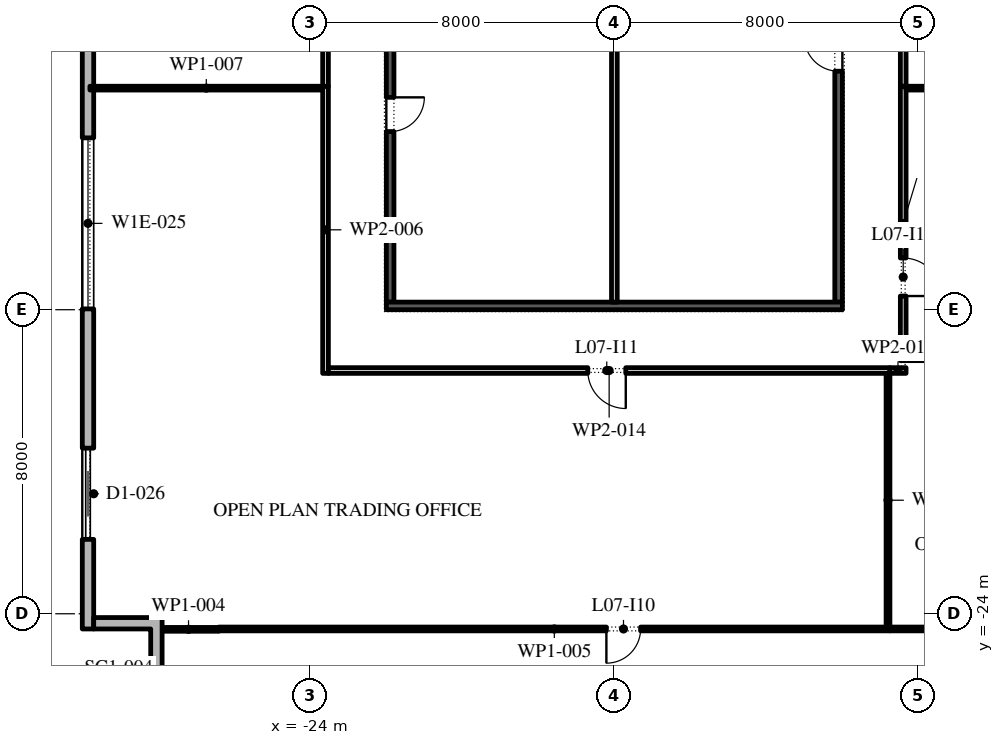
"""IFC4 building model, lengths in metres.
Left out: names, types, materials, properties, quantities, classifications, styles, units other than length and angle.
Written with IfcOpenShell. Run it as: python <this file> out.ifc"""

import sys

from ifc_helpers import new_model, si_unit, direction, frame, frame_2d, origin, place, context, subcontext, project, spatial, polyline, rectangle, outline, extrude, element, fill, save


model = new_model("IFC4")
c1 = context("Model", 3, precision=1e-05, world=origin(), true_north=direction((0.0, 1.0)))
c2 = subcontext(c1, "Body", "Model", "MODEL_VIEW")
j1 = project(units=[si_unit("LENGTHUNIT", "METRE"), si_unit("PLANEANGLEUNIT", "RADIAN")], contexts=[c1])
p1 = place(None, origin())
s1 = spatial("IfcSite", under=j1, at=p1, CompositionType="ELEMENT")
p2 = place(p1, origin())
s2 = spatial("IfcBuilding", under=s1, at=p2, CompositionType="ELEMENT")
p3 = place(p2, frame((0.0, 0.0, 39.6)))
s3 = spatial("IfcBuildingStorey", under=s2, at=p3, CompositionType="ELEMENT", Elevation=39.6)
p4 = place(p3, frame((-29.85, 25.1, 0.0), z_axis=(0.0, 0.0, 1.0), x_axis=(0.0, -1.0, 0.0)))
e1 = element("IfcWall", 1, at=p4, inside=s3, PredefinedType="STANDARD", context=c2, shape_type="SweptSolid", body=[
    extrude(rectangle(XDim=49.5, YDim=0.3, at=frame_2d((24.75, 0.0))), origin(), (0.0, 0.0, 1.0), 4.0),
])
p5 = place(p4, frame((1.157, 0.0, 0.45)))
e2 = element("IfcOpeningElement", 2, at=p5, cuts=e1, PredefinedType="OPENING", context=c2, shape_type="SweptSolid", body=[
    extrude(rectangle(XDim=4.5, YDim=2.875, at=frame_2d((2.25, 1.438))), frame((0.0, 0.16, 0.0), z_axis=(0.0, -1.0, 0.0), x_axis=(1.0, 0.0, 0.0)), (0.0, 0.0, 1.0), 0.32),
])
p6 = place(p4, frame((8.121, 0.0, 0.45)))
e3 = element("IfcOpeningElement", 3, at=p6, cuts=e1, PredefinedType="OPENING", context=c2, shape_type="SweptSolid", body=[
    extrude(rectangle(XDim=4.5, YDim=3.05, at=frame_2d((2.25, 1.525))), frame((0.0, 0.16, 0.0), z_axis=(0.0, -1.0, 0.0), x_axis=(1.0, 0.0, 0.0)), (0.0, 0.0, 1.0), 0.32),
])
p7 = place(p4, frame((16.286, 0.0, 0.0)))
e4 = element("IfcOpeningElement", 4, at=p7, cuts=e1, PredefinedType="OPENING", context=c2, shape_type="SweptSolid", body=[
    extrude(rectangle(XDim=2.4, YDim=3.325, at=frame_2d((1.2, 1.663))), frame((0.0, 0.16, 0.0), z_axis=(0.0, -1.0, 0.0), x_axis=(1.0, 0.0, 0.0)), (0.0, 0.0, 1.0), 0.32),
])
p8 = place(p4, frame((22.35, 0.0, 0.45)))
e5 = element("IfcOpeningElement", 5, at=p8, cuts=e1, PredefinedType="OPENING", context=c2, shape_type="SweptSolid", body=[
    extrude(rectangle(XDim=4.5, YDim=2.875, at=frame_2d((2.25, 1.438))), frame((0.0, 0.16, 0.0), z_axis=(0.0, -1.0, 0.0), x_axis=(1.0, 0.0, 0.0)), (0.0, 0.0, 1.0), 0.32),
])
p9 = place(p4, frame((29.464, 0.0, 0.45)))
e6 = element("IfcOpeningElement", 6, at=p9, cuts=e1, PredefinedType="OPENING", context=c2, shape_type="SweptSolid", body=[
    extrude(rectangle(XDim=4.5, YDim=2.875, at=frame_2d((2.25, 1.438))), frame((0.0, 0.16, 0.0), z_axis=(0.0, -1.0, 0.0), x_axis=(1.0, 0.0, 0.0)), (0.0, 0.0, 1.0), 0.32),
])
p10 = place(p4, frame((36.579, 0.0, 0.45)))
e7 = element("IfcOpeningElement", 7, at=p10, cuts=e1, PredefinedType="OPENING", context=c2, shape_type="SweptSolid", body=[
    extrude(rectangle(XDim=4.5, YDim=2.825, at=frame_2d((2.25, 1.413))), frame((0.0, 0.16, 0.0), z_axis=(0.0, -1.0, 0.0), x_axis=(1.0, 0.0, 0.0)), (0.0, 0.0, 1.0), 0.32),
])
p11 = place(p4, frame((44.743, 0.0, 0.0)))
e8 = element("IfcOpeningElement", 8, at=p11, cuts=e1, PredefinedType="OPENING", context=c2, shape_type="SweptSolid", body=[
    extrude(rectangle(XDim=2.4, YDim=3.5, at=frame_2d((1.2, 1.75))), frame((0.0, 0.16, 0.0), z_axis=(0.0, -1.0, 0.0), x_axis=(1.0, 0.0, 0.0)), (0.0, 0.0, 1.0), 0.32),
])
p12 = place(p3, origin())
e9 = element("IfcWall", 9, at=p12, inside=s3, PredefinedType="STANDARD", context=c2, shape_type="SweptSolid", body=[
    extrude(outline(polyline([(-26.4, -26.2), (-28.2, -26.2), (-28.2, -24.4), (-29.7, -24.4), (-29.7, -24.1), (-27.9, -24.1), (-27.9, -25.9), (-26.1, -25.9), (-26.1, -28.0), (-26.4, -28.0), (-26.4, -26.2)])), origin(), (0.0, 0.0, 1.0), 4.0),
])
p13 = place(p3, frame((-21.9, -15.8, 0.0), z_axis=(0.0, 0.0, 1.0), x_axis=(0.0, 1.0, 0.0)))
e10 = element("IfcWall", 10, at=p13, inside=s3, PredefinedType="SHEAR", context=c2, shape_type="SweptSolid", body=[
    extrude(rectangle(XDim=13.05, YDim=0.2, at=frame_2d((6.525, 0.0))), origin(), (0.0, 0.0, 1.0), 4.0),
])
p14 = place(p13, frame((4.488, 0.0, 0.0)))
e11 = element("IfcOpeningElement", 11, at=p14, cuts=e10, PredefinedType="OPENING", context=c2, shape_type="SweptSolid", body=[
    extrude(rectangle(XDim=0.9, YDim=2.1, at=frame_2d((0.45, 1.05))), frame((0.0, 0.11, 0.0), z_axis=(0.0, -1.0, 0.0), x_axis=(1.0, 0.0, 0.0)), (0.0, 0.0, 1.0), 0.22),
])
p15 = place(p13, frame((11.038, 0.0, 0.0)))
e12 = element("IfcOpeningElement", 12, at=p15, cuts=e10, PredefinedType="OPENING", context=c2, shape_type="SweptSolid", body=[
    extrude(rectangle(XDim=1.0, YDim=2.1, at=frame_2d((0.5, 1.05))), frame((0.0, 0.11, 0.0), z_axis=(0.0, -1.0, 0.0), x_axis=(1.0, 0.0, 0.0)), (0.0, 0.0, 1.0), 0.22),
])
p16 = place(p3, frame((-10.1, -15.8, 0.0), z_axis=(0.0, 0.0, 1.0), x_axis=(0.0, 1.0, 0.0)))
e13 = element("IfcWall", 13, at=p16, inside=s3, PredefinedType="SHEAR", context=c2, shape_type="SweptSolid", body=[
    extrude(rectangle(XDim=13.05, YDim=0.2, at=frame_2d((6.525, 0.0))), origin(), (0.0, 0.0, 1.0), 4.0),
])
p17 = place(p16, frame((6.075, 0.0, 0.0)))
e14 = element("IfcOpeningElement", 14, at=p17, cuts=e13, PredefinedType="OPENING", context=c2, shape_type="SweptSolid", body=[
    extrude(rectangle(XDim=0.9, YDim=2.1, at=frame_2d((0.45, 1.05))), frame((0.0, 0.11, 0.0), z_axis=(0.0, -1.0, 0.0), x_axis=(1.0, 0.0, 0.0)), (0.0, 0.0, 1.0), 0.22),
])
p18 = place(p3, frame((-22.0, -15.9, 0.0), z_axis=(0.0, 0.0, 1.0), x_axis=(1.0, 0.0, 0.0)))
e15 = element("IfcWall", 15, at=p18, inside=s3, PredefinedType="SHEAR", context=c2, shape_type="SweptSolid", body=[
    extrude(rectangle(XDim=12.0, YDim=0.2, at=frame_2d((6.0, 0.0))), origin(), (0.0, 0.0, 1.0), 4.0),
])
p19 = place(p3, frame((-16.0, -15.8, 0.0), z_axis=(0.0, 0.0, 1.0), x_axis=(0.0, 1.0, 0.0)))
e16 = element("IfcWall", 16, at=p19, inside=s3, PredefinedType="PARTITIONING", context=c2, shape_type="SweptSolid", body=[
    extrude(rectangle(XDim=13.05, YDim=0.15, at=frame_2d((6.525, 0.0))), origin(), (0.0, 0.0, 1.0), 4.0),
])
p20 = place(p19, frame((11.087, 0.0, 0.0)))
e17 = element("IfcOpeningElement", 17, at=p20, cuts=e16, PredefinedType="OPENING", context=c2, shape_type="SweptSolid", body=[
    extrude(rectangle(XDim=0.9, YDim=2.1, at=frame_2d((0.45, 1.05))), frame((0.0, 0.085, 0.0), z_axis=(0.0, -1.0, 0.0), x_axis=(1.0, 0.0, 0.0)), (0.0, 0.0, 1.0), 0.17),
])
p21 = place(p3, frame((-28.0, -24.41, 0.0), z_axis=(0.0, 0.0, 1.0), x_axis=(1.0, 0.0, 0.0)))
e18 = element("IfcWall", 18, at=p21, inside=s3, PredefinedType="PARTITIONING", context=c2, shape_type="SweptSolid", body=[
    extrude(rectangle(XDim=1.59, YDim=0.1, at=frame_2d((0.795, 0.0))), origin(), (0.0, 0.0, 1.0), 4.0),
])
p22 = place(p3, frame((-26.41, -24.4, 0.0), z_axis=(0.0, 0.0, 1.0), x_axis=(1.0, 0.0, 0.0)))
e19 = element("IfcWall", 19, at=p22, inside=s3, PredefinedType="PARTITIONING", context=c2, shape_type="SweptSolid", body=[
    extrude(rectangle(XDim=17.66, YDim=0.1, at=frame_2d((8.83, 0.0))), origin(), (0.0, 0.0, 1.0), 4.0),
])
p23 = place(p22, frame((10.2, 0.0, 0.0)))
e20 = element("IfcOpeningElement", 20, at=p23, cuts=e19, PredefinedType="OPENING", context=c2, shape_type="SweptSolid", body=[
    extrude(rectangle(XDim=0.9, YDim=2.1, at=frame_2d((0.45, 1.05))), frame((0.0, 0.06, 0.0), z_axis=(0.0, -1.0, 0.0), x_axis=(1.0, 0.0, 0.0)), (0.0, 0.0, 1.0), 0.12),
])
p24 = place(p3, frame((-23.6, -17.675, 0.0), z_axis=(0.0, 0.0, 1.0), x_axis=(0.0, 1.0, 0.0)))
e21 = element("IfcWall", 21, at=p24, inside=s3, PredefinedType="PARTITIONING", context=c2, shape_type="SweptSolid", body=[
    extrude(rectangle(XDim=7.555, YDim=0.15, at=frame_2d((3.777, 0.0))), origin(), (0.0, 0.0, 1.0), 4.0),
])
p25 = place(p3, frame((-23.675, -10.17, 0.0), z_axis=(0.0, 0.0, 1.0), x_axis=(-1.0, 0.0, 0.0)))
e22 = element("IfcWall", 22, at=p25, inside=s3, PredefinedType="PARTITIONING", context=c2, shape_type="SweptSolid", body=[
    extrude(rectangle(XDim=6.125, YDim=0.1, at=frame_2d((3.062, 0.0))), origin(), (0.0, 0.0, 1.0), 4.0),
])
p26 = place(p3, frame((-23.6, -10.12, 0.0), z_axis=(0.0, 0.0, 1.0), x_axis=(0.0, 1.0, 0.0)))
e23 = element("IfcWall", 23, at=p26, inside=s3, PredefinedType="PARTITIONING", context=c2, shape_type="SweptSolid", body=[
    extrude(rectangle(XDim=7.01, YDim=0.15, at=frame_2d((3.505, 0.0))), origin(), (0.0, 0.0, 1.0), 4.0),
])
p27 = place(p26, frame((2.41, 0.0, 0.0)))
e24 = element("IfcOpeningElement", 24, at=p27, cuts=e23, PredefinedType="OPENING", context=c2, shape_type="SweptSolid", body=[
    extrude(rectangle(XDim=1.0, YDim=2.1, at=frame_2d((0.5, 1.05))), frame((0.0, 0.085, 0.0), z_axis=(0.0, -1.0, 0.0), x_axis=(1.0, 0.0, 0.0)), (0.0, 0.0, 1.0), 0.17),
])
p28 = place(p3, frame((-8.75, -24.4, 0.0), z_axis=(0.0, 0.0, 1.0), x_axis=(1.0, 0.0, 0.0)))
e25 = element("IfcWall", 25, at=p28, inside=s3, PredefinedType="PARTITIONING", context=c2, shape_type="SweptSolid", body=[
    extrude(rectangle(XDim=10.2, YDim=0.1, at=frame_2d((5.1, 0.0))), origin(), (0.0, 0.0, 1.0), 4.0),
])
p29 = place(p3, frame((-8.75, -17.6, 0.0), z_axis=(0.0, 0.0, 1.0), x_axis=(-1.0, 0.0, 0.0)))
e26 = element("IfcWall", 26, at=p29, inside=s3, PredefinedType="PARTITIONING", context=c2, shape_type="SweptSolid", body=[
    extrude(rectangle(XDim=14.775, YDim=0.15, at=frame_2d((7.387, 0.0))), origin(), (0.0, 0.0, 1.0), 4.0),
])
p30 = place(p29, frame((6.95, 0.0, 0.0)))
e27 = element("IfcOpeningElement", 27, at=p30, cuts=e26, PredefinedType="OPENING", context=c2, shape_type="SweptSolid", body=[
    extrude(rectangle(XDim=1.0, YDim=2.1, at=frame_2d((0.5, 1.05))), frame((0.0, 0.085, 0.0), z_axis=(0.0, -1.0, 0.0), x_axis=(1.0, 0.0, 0.0)), (0.0, 0.0, 1.0), 0.17),
])
p31 = place(p3, frame((-8.8, -17.675, 0.0), z_axis=(0.0, 0.0, 1.0), x_axis=(0.0, -1.0, 0.0)))
e28 = element("IfcWall", 28, at=p31, inside=s3, PredefinedType="PARTITIONING", context=c2, shape_type="SweptSolid", body=[
    extrude(rectangle(XDim=6.675, YDim=0.1, at=frame_2d((3.337, 0.0))), origin(), (0.0, 0.0, 1.0), 4.0),
])
p32 = place(p3, frame((-8.325, -17.6, 0.0), z_axis=(0.0, 0.0, 1.0), x_axis=(-1.0, 0.0, 0.0)))
e29 = element("IfcWall", 29, at=p32, inside=s3, PredefinedType="PARTITIONING", context=c2, shape_type="SweptSolid", body=[
    extrude(rectangle(XDim=0.425, YDim=0.15, at=frame_2d((0.212, 0.0))), origin(), (0.0, 0.0, 1.0), 4.0),
])
p33 = place(p3, frame((-8.4, -10.12, 0.0), z_axis=(0.0, 0.0, 1.0), x_axis=(0.0, -1.0, 0.0)))
e30 = element("IfcWall", 30, at=p33, inside=s3, PredefinedType="PARTITIONING", context=c2, shape_type="SweptSolid", body=[
    extrude(rectangle(XDim=7.22, YDim=0.15, at=frame_2d((3.61, 0.0))), origin(), (0.0, 0.0, 1.0), 4.0),
])
p34 = place(p33, frame((4.52, 0.0, 0.0)))
e31 = element("IfcOpeningElement", 31, at=p34, cuts=e30, PredefinedType="OPENING", context=c2, shape_type="SweptSolid", body=[
    extrude(rectangle(XDim=1.0, YDim=2.1, at=frame_2d((0.5, 1.05))), frame((0.0, 0.085, 0.0), z_axis=(0.0, -1.0, 0.0), x_axis=(1.0, 0.0, 0.0)), (0.0, 0.0, 1.0), 0.17),
])
p35 = place(p3, frame((-8.4, -4.925, 0.0), z_axis=(0.0, 0.0, 1.0), x_axis=(0.0, -1.0, 0.0)))
e32 = element("IfcWall", 32, at=p35, inside=s3, PredefinedType="PARTITIONING", context=c2, shape_type="SweptSolid", body=[
    extrude(rectangle(XDim=5.195, YDim=0.15, at=frame_2d((2.598, 0.0))), origin(), (0.0, 0.0, 1.0), 4.0),
])
p36 = place(p3, frame((1.55, -17.29, 0.0), z_axis=(0.0, 0.0, 1.0), x_axis=(-1.0, 0.0, 0.0)))
e33 = element("IfcWall", 33, at=p36, inside=s3, PredefinedType="PARTITIONING", context=c2, shape_type="SweptSolid", body=[
    extrude(rectangle(XDim=9.875, YDim=0.1, at=frame_2d((4.938, 0.0))), origin(), (0.0, 0.0, 1.0), 4.0),
])
p37 = place(p36, frame((5.6, 0.0, 0.0)))
e34 = element("IfcOpeningElement", 34, at=p37, cuts=e33, PredefinedType="OPENING", context=c2, shape_type="SweptSolid", body=[
    extrude(rectangle(XDim=0.9, YDim=2.1, at=frame_2d((0.45, 1.05))), frame((0.0, 0.06, 0.0), z_axis=(0.0, -1.0, 0.0), x_axis=(1.0, 0.0, 0.0)), (0.0, 0.0, 1.0), 0.12),
])
p38 = place(p3, frame((8.325, -10.17, 0.0), z_axis=(0.0, 0.0, 1.0), x_axis=(-1.0, 0.0, 0.0)))
e35 = element("IfcWall", 35, at=p38, inside=s3, PredefinedType="PARTITIONING", context=c2, shape_type="SweptSolid", body=[
    extrude(rectangle(XDim=16.65, YDim=0.1, at=frame_2d((8.325, 0.0))), origin(), (0.0, 0.0, 1.0), 4.0),
])
p39 = place(p10, origin())
e36 = element("IfcWindow", 36, at=p39, inside=s3, PartitioningType="DOUBLE_PANEL_VERTICAL", PredefinedType="WINDOW", context=c2, shape_type="SweptSolid", body=[
    extrude(rectangle(XDim=4.5, YDim=2.825, at=frame_2d((2.25, 1.413))), frame((0.0, 0.03, 0.0), z_axis=(0.0, -1.0, 0.0), x_axis=(1.0, 0.0, 0.0)), (0.0, 0.0, 1.0), 0.06),
])
fill(e7, e36)
p40 = place(p11, origin())
e37 = element("IfcDoor", 37, at=p40, inside=s3, OperationType="DOUBLE_DOOR_SLIDING", PredefinedType="DOOR", context=c2, shape_type="SweptSolid", body=[
    extrude(rectangle(XDim=2.4, YDim=3.5, at=frame_2d((1.2, 1.75))), frame((0.0, 0.025, 0.0), z_axis=(0.0, -1.0, 0.0), x_axis=(1.0, 0.0, 0.0)), (0.0, 0.0, 1.0), 0.05),
])
fill(e8, e37)
p41 = place(p14, frame((0.9, -0.15, 0.0), z_axis=(0.0, 0.0, 1.0), x_axis=(-1.0, 0.0, 0.0)))
e38 = element("IfcDoor", 38, at=p41, inside=s3, OperationType="SINGLE_SWING_RIGHT", PredefinedType="DOOR", context=c2, shape_type="SweptSolid", body=[
    extrude(rectangle(XDim=0.9, YDim=2.1, at=frame_2d((0.45, 1.05))), frame((0.0, -0.05, 0.0), z_axis=(0.0, -1.0, 0.0), x_axis=(1.0, 0.0, 0.0)), (0.0, 0.0, 1.0), 0.05),
])
fill(e11, e38)
p42 = place(p17, origin())
e39 = element("IfcDoor", 39, at=p42, inside=s3, OperationType="SINGLE_SWING_LEFT", PredefinedType="DOOR", context=c2, shape_type="SweptSolid", body=[
    extrude(rectangle(XDim=0.9, YDim=2.1, at=frame_2d((0.45, 1.05))), frame((0.0, 0.1, 0.0), z_axis=(0.0, -1.0, 0.0), x_axis=(1.0, 0.0, 0.0)), (0.0, 0.0, 1.0), 0.05),
])
fill(e14, e39)
p43 = place(p23, frame((0.9, 0.0, 0.0), z_axis=(0.0, 0.0, 1.0), x_axis=(-1.0, 0.0, 0.0)))
e40 = element("IfcDoor", 40, at=p43, inside=s3, OperationType="SINGLE_SWING_LEFT", PredefinedType="DOOR", context=c2, shape_type="SweptSolid", body=[
    extrude(rectangle(XDim=0.9, YDim=2.1, at=frame_2d((0.45, 1.05))), frame((0.0, 0.025, 0.0), z_axis=(0.0, -1.0, 0.0), x_axis=(1.0, 0.0, 0.0)), (0.0, 0.0, 1.0), 0.05),
])
fill(e20, e40)
p44 = place(p30, origin())
e41 = element("IfcDoor", 41, at=p44, inside=s3, OperationType="SINGLE_SWING_RIGHT", PredefinedType="DOOR", context=c2, shape_type="SweptSolid", body=[
    extrude(rectangle(XDim=1.0, YDim=2.1, at=frame_2d((0.5, 1.05))), frame((0.0, 0.025, 0.0), z_axis=(0.0, -1.0, 0.0), x_axis=(1.0, 0.0, 0.0)), (0.0, 0.0, 1.0), 0.05),
])
fill(e27, e41)
p45 = place(p34, origin())
e42 = element("IfcDoor", 42, at=p45, inside=s3, OperationType="SINGLE_SWING_LEFT", PredefinedType="DOOR", context=c2, shape_type="SweptSolid", body=[
    extrude(rectangle(XDim=1.0, YDim=2.1, at=frame_2d((0.5, 1.05))), frame((0.0, 0.025, 0.0), z_axis=(0.0, -1.0, 0.0), x_axis=(1.0, 0.0, 0.0)), (0.0, 0.0, 1.0), 0.05),
])
fill(e31, e42)
save(model, sys.argv[1])
